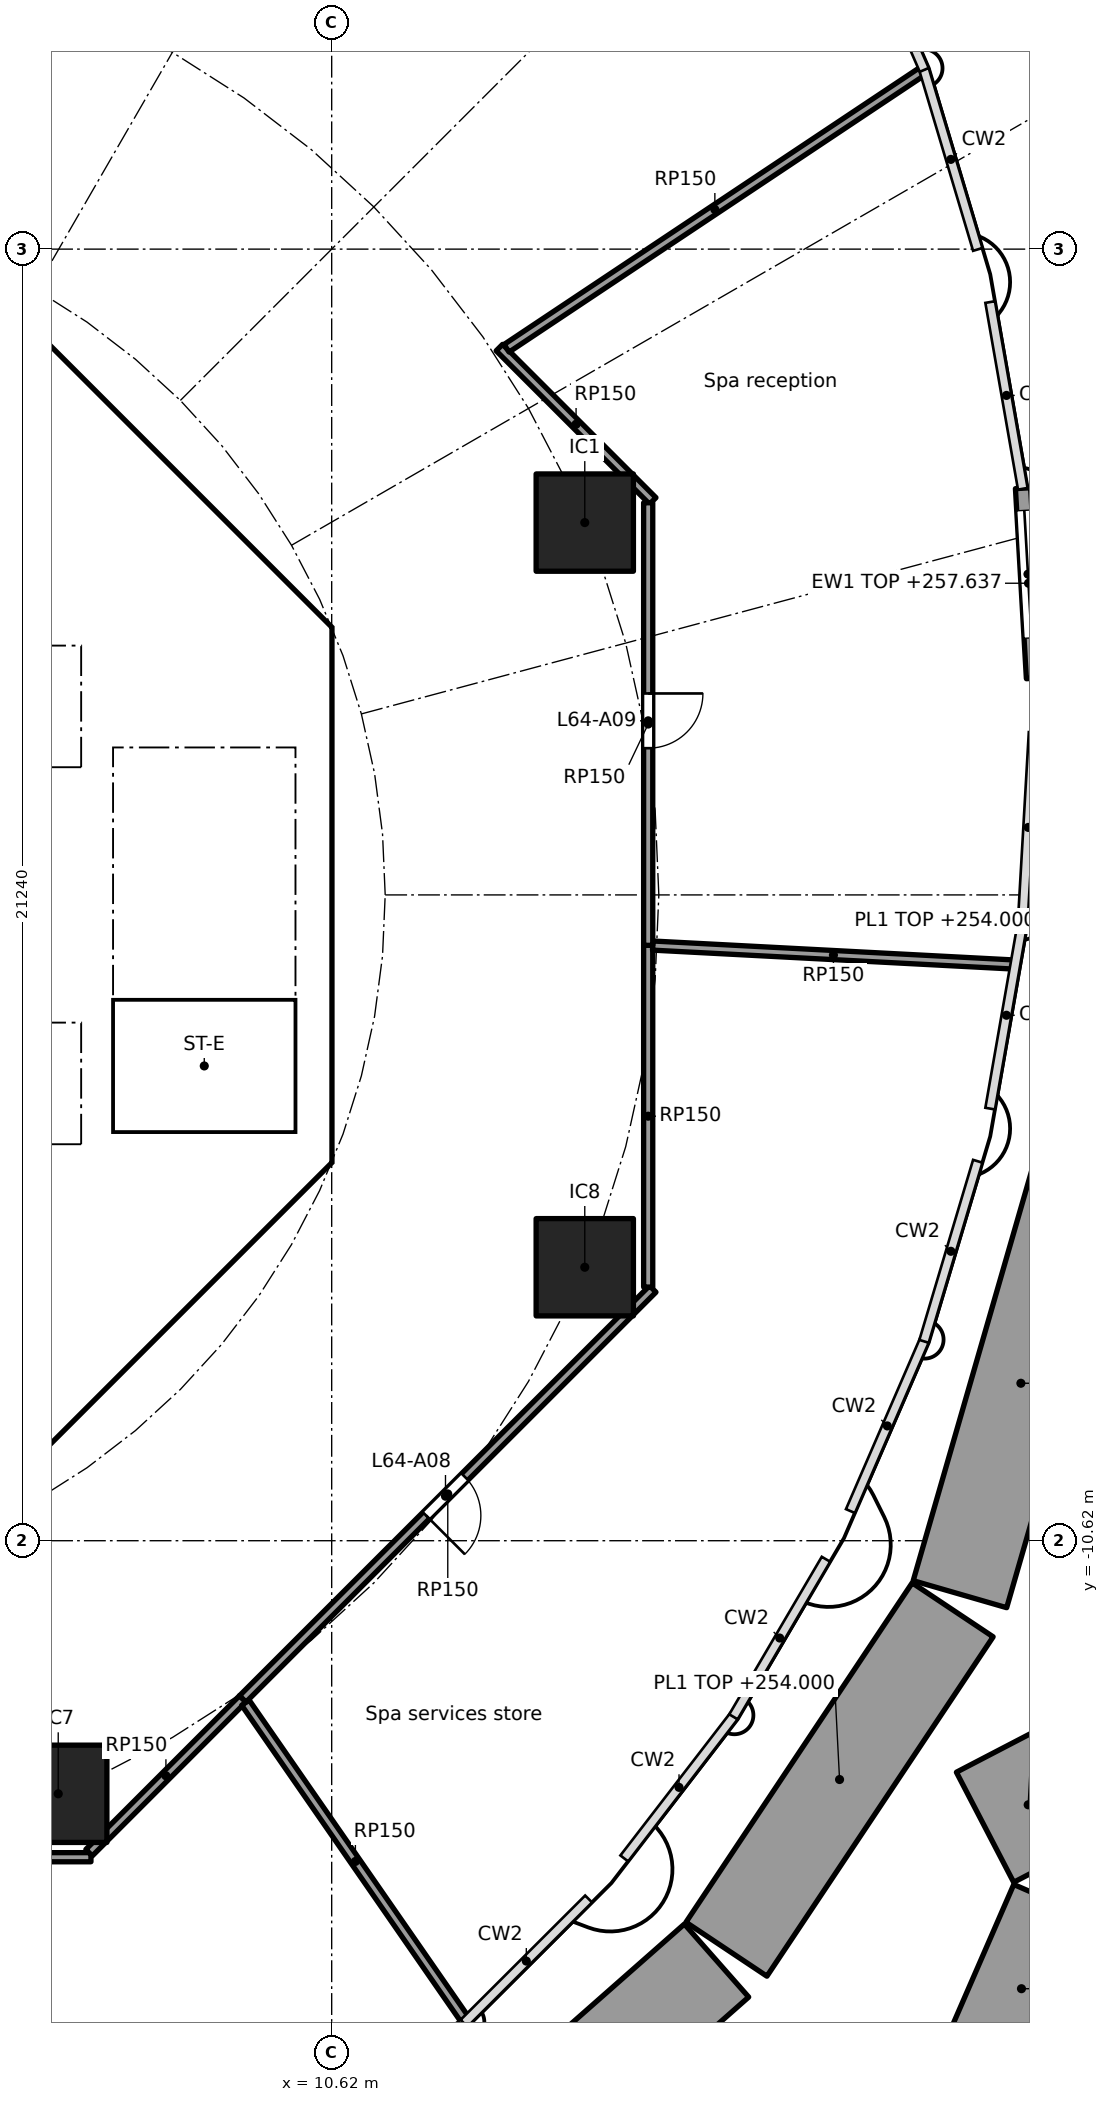
"""IFC4 building model, lengths in metres.
Left out: names, types, materials, properties, quantities, classifications, styles, units other than length and angle.
Written with IfcOpenShell. Run it as: python <this file> out.ifc"""

import sys

from ifc_helpers import new_model, si_unit, direction, frame, frame_2d, origin, origin_2d, place, context, subcontext, project, spatial, polyline, rectangle, outline, extrude, element, fill, save


model = new_model("IFC4")
c1 = context("Model", 3, precision=1e-05, world=origin(), true_north=direction((0.0, 1.0)))
c2 = subcontext(c1, "Body", "Model", "MODEL_VIEW")
j1 = project(units=[si_unit("LENGTHUNIT", "METRE"), si_unit("PLANEANGLEUNIT", "RADIAN")], contexts=[c1])
p1 = place(None, origin())
s1 = spatial("IfcSite", under=j1, at=p1, CompositionType="ELEMENT")
p2 = place(p1, origin())
s2 = spatial("IfcBuilding", under=s1, at=p2, CompositionType="ELEMENT")
p3 = place(p2, frame((0.0, 0.0, 252.9)))
s3 = spatial("IfcBuildingStorey", under=s2, at=p3, CompositionType="ELEMENT", Elevation=252.9)
for number, where, z_axis, x_axis in (
    (1, (14.782, 6.123, 0.0), (0.0, 0.0, 1.0), (1.0, 0.0, 0.0)),
    (2, (6.123, -14.782, 0.0), (0.0, 0.0, 1.0), (1.0, 0.0, 0.0)),
    (3, (14.782, -6.123, 0.0), (0.0, 0.0, 1.0), (1.0, 0.0, 0.0)),
):
    element("IfcColumn", number, at=place(p3, frame(where, z_axis=z_axis, x_axis=x_axis)), inside=s3, PredefinedType="COLUMN", context=c2, shape_type="SweptSolid", body=[
        extrude(rectangle(XDim=1.6, YDim=1.6, at=origin_2d()), origin(), (0.0, 0.0, 1.0), 5.6),
    ])
p4 = place(p3, frame((21.989, 6.688, 0.0), z_axis=(0.0, 0.0, 1.0), x_axis=(0.057469494081, -0.998347262855, 0.0)))
e4 = element("IfcWall", 4, at=p4, inside=s3, PredefinedType="SOLIDWALL", context=c2, shape_type="SweptSolid", body=[
    extrude(rectangle(XDim=3.131, YDim=0.25, at=frame_2d((1.565, 0.0))), origin(), (0.0, 0.0, 1.0), 4.737),
])
p5 = place(p4, frame((0.365, 0.0, 0.0)))
e5 = element("IfcOpeningElement", 5, at=p5, cuts=e4, PredefinedType="OPENING", context=c2, shape_type="SweptSolid", body=[
    extrude(rectangle(XDim=2.1, YDim=2.4, at=frame_2d((1.05, 1.2))), frame((0.0, 0.135, 0.0), z_axis=(0.0, -1.0, 0.0), x_axis=(1.0, 0.0, 0.0)), (0.0, 0.0, 1.0), 0.27),
])
p6 = place(p3, frame((11.206, -22.583, 0.0), z_axis=(0.0, 0.0, 1.0), x_axis=(0.75035522749, 0.66103481949, 0.0)))
e6 = element("IfcWall", 6, at=p6, inside=s3, PredefinedType="SOLIDWALL", context=c2, shape_type="SweptSolid", body=[
    extrude(rectangle(XDim=7.653, YDim=1.6, at=frame_2d((3.827, 0.0))), origin(), (0.0, 0.0, 1.0), 1.1),
])
p7 = place(p3, frame((17.112, -17.338, 0.0), z_axis=(0.0, 0.0, 1.0), x_axis=(0.554674997089, 0.832067093211, 0.0)))
e7 = element("IfcWall", 7, at=p7, inside=s3, PredefinedType="SOLIDWALL", context=c2, shape_type="SweptSolid", body=[
    extrude(rectangle(XDim=6.708, YDim=1.6, at=frame_2d((3.354, 0.0))), origin(), (0.0, 0.0, 1.0), 1.1),
])
p8 = place(p3, frame((20.952, -11.5, 0.0), z_axis=(0.0, 0.0, 1.0), x_axis=(0.277631182754, 0.960687736136, 0.0)))
e8 = element("IfcWall", 8, at=p8, inside=s3, PredefinedType="SOLIDWALL", context=c2, shape_type="SweptSolid", body=[
    extrude(rectangle(XDim=7.221, YDim=1.6, at=frame_2d((3.611, 0.0))), origin(), (0.0, 0.0, 1.0), 1.1),
])
p9 = place(p3, frame((21.603, -14.058, 0.0), z_axis=(0.0, 0.0, 1.0), x_axis=(0.461559904167, -0.88710904339, 0.0)))
e9 = element("IfcWall", 9, at=p9, inside=s3, PredefinedType="SOLIDWALL", context=c2, shape_type="SweptSolid", body=[
    extrude(rectangle(XDim=2.041, YDim=1.6, at=frame_2d((1.021, 0.0))), origin(), (0.0, 0.0, 1.0), 1.1),
])
p10 = place(p3, frame((22.57, -16.593, 0.0), z_axis=(0.0, 0.0, 1.0), x_axis=(-0.398805347821, -0.917035601571, 0.0)))
e10 = element("IfcWall", 10, at=p10, inside=s3, PredefinedType="SOLIDWALL", context=c2, shape_type="SweptSolid", body=[
    extrude(rectangle(XDim=3.042, YDim=1.6, at=frame_2d((1.521, 0.0))), origin(), (0.0, 0.0, 1.0), 1.1),
])
p11 = place(p3, frame((9.988, 4.613, 0.0), z_axis=(0.0, 0.0, 1.0), x_axis=(-0.707106781187, 0.707106781187, 0.0)))
e11 = element("IfcWall", 11, at=p11, inside=s3, PredefinedType="SHEAR", context=c2, shape_type="SweptSolid", body=[
    extrude(rectangle(XDim=7.602, YDim=0.6, at=frame_2d((3.801, 0.0))), origin(), (0.0, 0.0, 1.0), 5.34),
])
p12 = place(p11, frame((3.201, 0.0, 0.0)))
e12 = element("IfcOpeningElement", 12, at=p12, cuts=e11, PredefinedType="OPENING", context=c2, shape_type="SweptSolid", body=[
    extrude(rectangle(XDim=1.2, YDim=2.1, at=frame_2d((0.6, 1.05))), frame((0.0, 0.31, 0.0), z_axis=(0.0, -1.0, 0.0), x_axis=(1.0, 0.0, 0.0)), (0.0, 0.0, 1.0), 0.62),
])
p13 = place(p3, frame((4.613, -9.988, 0.0), z_axis=(0.0, 0.0, 1.0), x_axis=(0.707106781187, 0.707106781187, 0.0)))
e13 = element("IfcWall", 13, at=p13, inside=s3, PredefinedType="SHEAR", context=c2, shape_type="SweptSolid", body=[
    extrude(rectangle(XDim=7.602, YDim=0.6, at=frame_2d((3.801, 0.0))), origin(), (0.0, 0.0, 1.0), 5.34),
])
p14 = place(p13, frame((3.201, 0.0, 0.0)))
e14 = element("IfcOpeningElement", 14, at=p14, cuts=e13, PredefinedType="OPENING", context=c2, shape_type="SweptSolid", body=[
    extrude(rectangle(XDim=1.2, YDim=2.1, at=frame_2d((0.6, 1.05))), frame((0.0, 0.31, 0.0), z_axis=(0.0, -1.0, 0.0), x_axis=(1.0, 0.0, 0.0)), (0.0, 0.0, 1.0), 0.62),
])
p15 = place(p3, frame((-6.7, 2.0, 0.0), z_axis=(0.0, 0.0, 1.0), x_axis=(1.0, 0.0, 0.0)))
e15 = element("IfcWall", 15, at=p15, inside=s3, PredefinedType="SOLIDWALL", context=c2, shape_type="SweptSolid", body=[
    extrude(rectangle(XDim=13.4, YDim=0.2, at=frame_2d((6.7, 0.0))), origin(), (0.0, 0.0, 1.0), 5.34),
])
p16 = place(p15, frame((7.25, 0.0, 0.0)))
e16 = element("IfcOpeningElement", 16, at=p16, cuts=e15, PredefinedType="OPENING", context=c2, shape_type="SweptSolid", body=[
    extrude(rectangle(XDim=1.1, YDim=2.1, at=frame_2d((0.55, 1.05))), frame((0.0, 0.11, 0.0), z_axis=(0.0, -1.0, 0.0), x_axis=(1.0, 0.0, 0.0)), (0.0, 0.0, 1.0), 0.22),
])
p17 = place(p15, frame((9.45, 0.0, 0.0)))
e17 = element("IfcOpeningElement", 17, at=p17, cuts=e15, PredefinedType="OPENING", context=c2, shape_type="SweptSolid", body=[
    extrude(rectangle(XDim=1.1, YDim=2.1, at=frame_2d((0.55, 1.05))), frame((0.0, 0.11, 0.0), z_axis=(0.0, -1.0, 0.0), x_axis=(1.0, 0.0, 0.0)), (0.0, 0.0, 1.0), 0.22),
])
p18 = place(p15, frame((11.65, 0.0, 0.0)))
e18 = element("IfcOpeningElement", 18, at=p18, cuts=e15, PredefinedType="OPENING", context=c2, shape_type="SweptSolid", body=[
    extrude(rectangle(XDim=1.1, YDim=2.1, at=frame_2d((0.55, 1.05))), frame((0.0, 0.11, 0.0), z_axis=(0.0, -1.0, 0.0), x_axis=(1.0, 0.0, 0.0)), (0.0, 0.0, 1.0), 0.22),
])
p19 = place(p15, frame((2.95, 0.0, 0.0)))
e19 = element("IfcOpeningElement", 19, at=p19, cuts=e15, PredefinedType="OPENING", context=c2, shape_type="SweptSolid", body=[
    extrude(rectangle(XDim=0.9, YDim=2.1, at=frame_2d((0.45, 1.05))), frame((0.0, 0.11, 0.0), z_axis=(0.0, -1.0, 0.0), x_axis=(1.0, 0.0, 0.0)), (0.0, 0.0, 1.0), 0.22),
])
p20 = place(p3, frame((6.7, 4.0, 0.0), z_axis=(0.0, 0.0, 1.0), x_axis=(1.0, 0.0, 0.0)))
e20 = element("IfcWall", 20, at=p20, inside=s3, PredefinedType="SOLIDWALL", context=c2, shape_type="SweptSolid", body=[
    extrude(rectangle(XDim=3.325, YDim=0.2, at=frame_2d((1.662, 0.0))), origin(), (0.0, 0.0, 1.0), 5.34),
])
p21 = place(p20, frame((1.25, 0.0, 0.0)))
e21 = element("IfcOpeningElement", 21, at=p21, cuts=e20, PredefinedType="OPENING", context=c2, shape_type="SweptSolid", body=[
    extrude(rectangle(XDim=1.1, YDim=2.1, at=frame_2d((0.55, 1.05))), frame((0.0, 0.11, 0.0), z_axis=(0.0, -1.0, 0.0), x_axis=(1.0, 0.0, 0.0)), (0.0, 0.0, 1.0), 0.22),
])
p22 = place(p3, frame((-6.7, -2.0, 0.0), z_axis=(0.0, 0.0, 1.0), x_axis=(1.0, 0.0, 0.0)))
e22 = element("IfcWall", 22, at=p22, inside=s3, PredefinedType="SOLIDWALL", context=c2, shape_type="SweptSolid", body=[
    extrude(rectangle(XDim=13.4, YDim=0.2, at=frame_2d((6.7, 0.0))), origin(), (0.0, 0.0, 1.0), 5.34),
])
p23 = place(p22, frame((5.05, 0.0, 0.0)))
e23 = element("IfcOpeningElement", 23, at=p23, cuts=e22, PredefinedType="OPENING", context=c2, shape_type="SweptSolid", body=[
    extrude(rectangle(XDim=1.1, YDim=2.1, at=frame_2d((0.55, 1.05))), frame((0.0, 0.11, 0.0), z_axis=(0.0, -1.0, 0.0), x_axis=(1.0, 0.0, 0.0)), (0.0, 0.0, 1.0), 0.22),
])
p24 = place(p22, frame((7.25, 0.0, 0.0)))
e24 = element("IfcOpeningElement", 24, at=p24, cuts=e22, PredefinedType="OPENING", context=c2, shape_type="SweptSolid", body=[
    extrude(rectangle(XDim=1.1, YDim=2.1, at=frame_2d((0.55, 1.05))), frame((0.0, 0.11, 0.0), z_axis=(0.0, -1.0, 0.0), x_axis=(1.0, 0.0, 0.0)), (0.0, 0.0, 1.0), 0.22),
])
p25 = place(p22, frame((9.45, 0.0, 0.0)))
e25 = element("IfcOpeningElement", 25, at=p25, cuts=e22, PredefinedType="OPENING", context=c2, shape_type="SweptSolid", body=[
    extrude(rectangle(XDim=1.1, YDim=2.1, at=frame_2d((0.55, 1.05))), frame((0.0, 0.11, 0.0), z_axis=(0.0, -1.0, 0.0), x_axis=(1.0, 0.0, 0.0)), (0.0, 0.0, 1.0), 0.22),
])
p26 = place(p22, frame((11.65, 0.0, 0.0)))
e26 = element("IfcOpeningElement", 26, at=p26, cuts=e22, PredefinedType="OPENING", context=c2, shape_type="SweptSolid", body=[
    extrude(rectangle(XDim=1.1, YDim=2.1, at=frame_2d((0.55, 1.05))), frame((0.0, 0.11, 0.0), z_axis=(0.0, -1.0, 0.0), x_axis=(1.0, 0.0, 0.0)), (0.0, 0.0, 1.0), 0.22),
])
p27 = place(p22, frame((1.85, 0.0, 0.0)))
e27 = element("IfcOpeningElement", 27, at=p27, cuts=e22, PredefinedType="OPENING", context=c2, shape_type="SweptSolid", body=[
    extrude(rectangle(XDim=0.9, YDim=2.1, at=frame_2d((0.45, 1.05))), frame((0.0, 0.11, 0.0), z_axis=(0.0, -1.0, 0.0), x_axis=(1.0, 0.0, 0.0)), (0.0, 0.0, 1.0), 0.22),
])
p28 = place(p3, origin())
e28 = element("IfcWall", 28, at=p28, inside=s3, PredefinedType="SHEAR", context=c2, shape_type="SweptSolid", body=[
    extrude(outline(polyline([(9.776, -4.401), (10.025, -4.152), (10.025, -3.801), (10.025, 4.152), (9.776, 4.401), (10.2, 4.825), (10.625, 4.401), (10.625, -4.401), (10.2, -4.825), (9.776, -4.401)])), origin(), (0.0, 0.0, 1.0), 5.34),
])
p29 = place(p3, origin())
e29 = element("IfcWall", 29, at=p29, inside=s3, PredefinedType="SOLIDWALL", context=c2, shape_type="SweptSolid", body=[
    extrude(outline(polyline([(-6.7, -2.1), (-6.5, -2.1), (-6.5, -4.1), (-2.3, -4.1), (-2.3, -2.1), (-2.1, -2.1), (-2.1, -4.1), (-0.1, -4.1), (-0.1, -2.1), (0.1, -2.1), (0.1, -4.1), (2.1, -4.1), (2.1, -2.1), (2.3, -2.1), (2.3, -4.1), (4.3, -4.1), (4.3, -2.1), (4.5, -2.1), (4.5, -4.1), (6.5, -4.1), (6.5, -2.1), (6.7, -2.1), (6.7, -4.3), (-6.7, -4.3), (-6.7, -2.1)])), origin(), (0.0, 0.0, 1.0), 5.34),
])
p30 = place(p3, origin())
e30 = element("IfcWall", 30, at=p30, inside=s3, PredefinedType="SOLIDWALL", context=c2, shape_type="SweptSolid", body=[
    extrude(outline(polyline([(-6.7, 4.3), (6.7, 4.3), (6.7, 2.1), (6.5, 2.1), (6.5, 4.1), (4.5, 4.1), (4.5, 2.1), (4.3, 2.1), (4.3, 4.1), (2.3, 4.1), (2.3, 2.1), (2.1, 2.1), (2.1, 4.1), (0.1, 4.1), (0.1, 2.1), (-0.1, 2.1), (-0.1, 4.1), (-6.5, 4.1), (-6.5, 2.1), (-6.7, 2.1), (-6.7, 4.3)])), origin(), (0.0, 0.0, 1.0), 5.34),
])
p31 = place(p3, origin())
e31 = element("IfcWall", 31, at=p31, inside=s3, PredefinedType="SOLIDWALL", context=c2, shape_type="SweptSolid", body=[
    extrude(outline(polyline([(7.025, -3.9), (6.7, -3.9), (6.7, 3.9), (7.025, 3.9), (7.025, -3.9)])), origin(), (0.0, 0.0, 1.0), 5.34),
])
p32 = place(p3, origin())
e32 = element("IfcWall", 32, at=p32, inside=s3, PredefinedType="SOLIDWALL", context=c2, shape_type="SweptSolid", body=[
    extrude(outline(polyline([(10.025, -4.1), (6.7, -4.1), (6.7, -3.9), (10.025, -3.9), (10.025, -4.1)])), origin(), (0.0, 0.0, 1.0), 5.34),
])
p33 = place(p3, frame((6.661, -15.825, 0.0), z_axis=(0.0, 0.0, 1.0), x_axis=(-1.0, 0.0, 0.0)))
e33 = element("IfcWall", 33, at=p33, inside=s3, PredefinedType="PARTITIONING", context=c2, shape_type="SweptSolid", body=[
    extrude(rectangle(XDim=9.938, YDim=0.15, at=frame_2d((4.969, 0.0))), origin(), (0.0, 0.0, 1.0), 5.34),
])
p34 = place(p33, frame((4.422, 0.0, 0.0)))
e34 = element("IfcOpeningElement", 34, at=p34, cuts=e33, PredefinedType="OPENING", context=c2, shape_type="SweptSolid", body=[
    extrude(rectangle(XDim=1.2, YDim=2.1, at=frame_2d((0.6, 1.05))), frame((0.0, 0.085, 0.0), z_axis=(0.0, -1.0, 0.0), x_axis=(1.0, 0.0, 0.0)), (0.0, 0.0, 1.0), 0.17),
])
p35 = place(p3, frame((9.158, -13.221, 0.0), z_axis=(0.0, 0.0, 1.0), x_axis=(-0.706970221364, -0.707243314641, 0.0)))
e35 = element("IfcWall", 35, at=p35, inside=s3, PredefinedType="PARTITIONING", context=c2, shape_type="SweptSolid", body=[
    extrude(rectangle(XDim=3.576, YDim=0.15, at=frame_2d((1.788, 0.0))), origin(), (0.0, 0.0, 1.0), 5.34),
])
p36 = place(p3, frame((9.201, -13.284, 0.0), z_axis=(0.0, 0.0, 1.0), x_axis=(0.569459783046, -0.822019194115, 0.0)))
e36 = element("IfcWall", 36, at=p36, inside=s3, PredefinedType="PARTITIONING", context=c2, shape_type="SweptSolid", body=[
    extrude(rectangle(XDim=6.352, YDim=0.15, at=frame_2d((3.176, 0.0))), origin(), (0.0, 0.0, 1.0), 5.34),
])
p37 = place(p3, frame((13.378, 9.001, 0.0), z_axis=(0.0, 0.0, 1.0), x_axis=(0.707243697976, -0.70696983788, 0.0)))
e37 = element("IfcWall", 37, at=p37, inside=s3, PredefinedType="PARTITIONING", context=c2, shape_type="SweptSolid", body=[
    extrude(rectangle(XDim=3.566, YDim=0.15, at=frame_2d((1.783, 0.0))), origin(), (0.0, 0.0, 1.0), 5.34),
])
p38 = place(p3, frame((15.9, -6.48, 0.0), z_axis=(0.0, 0.0, 1.0), x_axis=(-0.70715799483, -0.707055563833, 0.0)))
e38 = element("IfcWall", 38, at=p38, inside=s3, PredefinedType="PARTITIONING", context=c2, shape_type="SweptSolid", body=[
    extrude(rectangle(XDim=9.534, YDim=0.15, at=frame_2d((4.767, 0.0))), origin(), (0.0, 0.0, 1.0), 5.34),
])
p39 = place(p38, frame((4.37, 0.0, 0.0)))
e39 = element("IfcOpeningElement", 39, at=p39, cuts=e38, PredefinedType="OPENING", context=c2, shape_type="SweptSolid", body=[
    extrude(rectangle(XDim=0.9, YDim=2.1, at=frame_2d((0.45, 1.05))), frame((0.0, 0.085, 0.0), z_axis=(0.0, -1.0, 0.0), x_axis=(1.0, 0.0, 0.0)), (0.0, 0.0, 1.0), 0.17),
])
p40 = place(p3, frame((15.825, -0.829, 0.0), z_axis=(0.0, 0.0, 1.0), x_axis=(0.0, -1.0, 0.0)))
e40 = element("IfcWall", 40, at=p40, inside=s3, PredefinedType="PARTITIONING", context=c2, shape_type="SweptSolid", body=[
    extrude(rectangle(XDim=5.62, YDim=0.15, at=frame_2d((2.81, 0.0))), origin(), (0.0, 0.0, 1.0), 5.34),
])
p41 = place(p3, frame((15.9, -0.833, 0.0), z_axis=(0.0, 0.0, 1.0), x_axis=(0.998626655177, -0.052390872958, 0.0)))
e41 = element("IfcWall", 41, at=p41, inside=s3, PredefinedType="PARTITIONING", context=c2, shape_type="SweptSolid", body=[
    extrude(rectangle(XDim=5.951, YDim=0.15, at=frame_2d((2.975, 0.0))), origin(), (0.0, 0.0, 1.0), 5.34),
])
p42 = place(p3, frame((15.825, 6.449, 0.0), z_axis=(0.0, 0.0, 1.0), x_axis=(0.0, -1.0, 0.0)))
e42 = element("IfcWall", 42, at=p42, inside=s3, PredefinedType="PARTITIONING", context=c2, shape_type="SweptSolid", body=[
    extrude(rectangle(XDim=7.278, YDim=0.15, at=frame_2d((3.639, 0.0))), origin(), (0.0, 0.0, 1.0), 5.34),
])
p43 = place(p42, frame((3.136, 0.0, 0.0)))
e43 = element("IfcOpeningElement", 43, at=p43, cuts=e42, PredefinedType="OPENING", context=c2, shape_type="SweptSolid", body=[
    extrude(rectangle(XDim=0.9, YDim=2.1, at=frame_2d((0.45, 1.05))), frame((0.0, 0.085, 0.0), z_axis=(0.0, -1.0, 0.0), x_axis=(1.0, 0.0, 0.0)), (0.0, 0.0, 1.0), 0.17),
])
p44 = place(p3, frame((20.347, 13.554, 0.0), z_axis=(0.0, 0.0, 1.0), x_axis=(-0.832246423535, -0.554405889681, 0.0)))
e44 = element("IfcWall", 44, at=p44, inside=s3, PredefinedType="PARTITIONING", context=c2, shape_type="SweptSolid", body=[
    extrude(rectangle(XDim=8.233, YDim=0.15, at=frame_2d((4.116, 0.0))), origin(), (0.0, 0.0, 1.0), 5.34),
])
p45 = place(p5, origin())
e45 = element("IfcDoor", 45, at=p45, inside=s3, OperationType="SLIDING_TO_LEFT", PredefinedType="DOOR", context=c2, shape_type="SweptSolid", body=[
    extrude(rectangle(XDim=2.1, YDim=2.4, at=frame_2d((1.05, 1.2))), frame((0.0, 0.025, 0.0), z_axis=(0.0, -1.0, 0.0), x_axis=(1.0, 0.0, 0.0)), (0.0, 0.0, 1.0), 0.05),
])
fill(e5, e45)
p46 = place(p18, origin())
e46 = element("IfcDoor", 46, at=p46, inside=s3, OperationType="DOUBLE_DOOR_SLIDING", PredefinedType="DOOR", context=c2, shape_type="SweptSolid", body=[
    extrude(rectangle(XDim=1.1, YDim=2.1, at=frame_2d((0.55, 1.05))), frame((0.0, 0.025, 0.0), z_axis=(0.0, -1.0, 0.0), x_axis=(1.0, 0.0, 0.0)), (0.0, 0.0, 1.0), 0.05),
])
fill(e18, e46)
p47 = place(p26, origin())
e47 = element("IfcDoor", 47, at=p47, inside=s3, OperationType="DOUBLE_DOOR_SLIDING", PredefinedType="DOOR", context=c2, shape_type="SweptSolid", body=[
    extrude(rectangle(XDim=1.1, YDim=2.1, at=frame_2d((0.55, 1.05))), frame((0.0, 0.025, 0.0), z_axis=(0.0, -1.0, 0.0), x_axis=(1.0, 0.0, 0.0)), (0.0, 0.0, 1.0), 0.05),
])
fill(e26, e47)
p48 = place(p21, frame((1.1, 0.0, 0.0), x_axis=(-1.0, 0.0, 0.0)))
e48 = element("IfcDoor", 48, at=p48, inside=s3, OperationType="SINGLE_SWING_RIGHT", PredefinedType="DOOR", context=c2, shape_type="SweptSolid", body=[
    extrude(rectangle(XDim=1.1, YDim=2.1, at=frame_2d((0.55, 1.05))), frame((0.0, 0.025, 0.0), z_axis=(0.0, -1.0, 0.0), x_axis=(1.0, 0.0, 0.0)), (0.0, 0.0, 1.0), 0.05),
])
fill(e21, e48)
p49 = place(p12, origin())
e49 = element("IfcDoor", 49, at=p49, inside=s3, OperationType="SINGLE_SWING_LEFT", PredefinedType="DOOR", context=c2, shape_type="SweptSolid", body=[
    extrude(rectangle(XDim=1.2, YDim=2.1, at=frame_2d((0.6, 1.05))), frame((0.0, 0.025, 0.0), z_axis=(0.0, -1.0, 0.0), x_axis=(1.0, 0.0, 0.0)), (0.0, 0.0, 1.0), 0.05),
])
fill(e12, e49)
p50 = place(p14, origin())
e50 = element("IfcDoor", 50, at=p50, inside=s3, OperationType="SINGLE_SWING_LEFT", PredefinedType="DOOR", context=c2, shape_type="SweptSolid", body=[
    extrude(rectangle(XDim=1.2, YDim=2.1, at=frame_2d((0.6, 1.05))), frame((0.0, 0.025, 0.0), z_axis=(0.0, -1.0, 0.0), x_axis=(1.0, 0.0, 0.0)), (0.0, 0.0, 1.0), 0.05),
])
fill(e14, e50)
p51 = place(p39, origin())
e51 = element("IfcDoor", 51, at=p51, inside=s3, OperationType="SINGLE_SWING_RIGHT", PredefinedType="DOOR", context=c2, shape_type="SweptSolid", body=[
    extrude(rectangle(XDim=0.9, YDim=2.1, at=frame_2d((0.45, 1.05))), frame((0.0, 0.025, 0.0), z_axis=(0.0, -1.0, 0.0), x_axis=(1.0, 0.0, 0.0)), (0.0, 0.0, 1.0), 0.05),
])
fill(e39, e51)
p52 = place(p43, origin())
e52 = element("IfcDoor", 52, at=p52, inside=s3, OperationType="SINGLE_SWING_LEFT", PredefinedType="DOOR", context=c2, shape_type="SweptSolid", body=[
    extrude(rectangle(XDim=0.9, YDim=2.1, at=frame_2d((0.45, 1.05))), frame((0.0, 0.025, 0.0), z_axis=(0.0, -1.0, 0.0), x_axis=(1.0, 0.0, 0.0)), (0.0, 0.0, 1.0), 0.05),
])
fill(e43, e52)
save(model, sys.argv[1])
